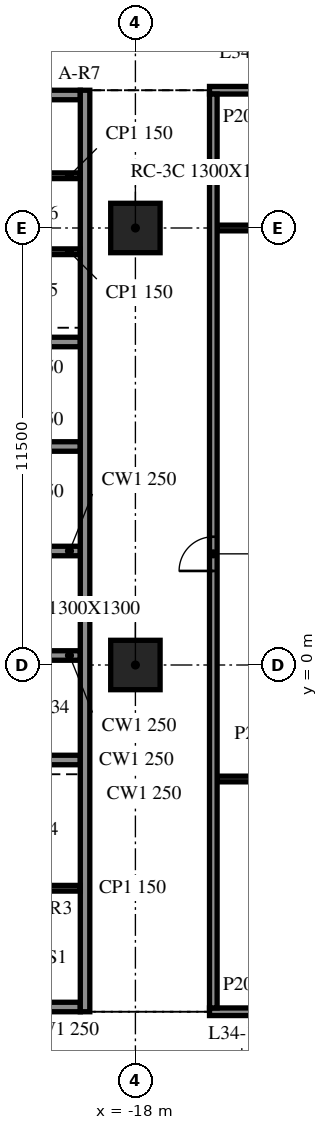
"""IFC4 building model, lengths in metres.
Left out: names, types, materials, properties, quantities, classifications, styles, units other than length and angle.
Written with IfcOpenShell. Run it as: python <this file> out.ifc"""

import sys

from ifc_helpers import new_model, si_unit, direction, frame, frame_2d, origin, origin_2d, place, context, subcontext, project, spatial, rectangle, extrude, element, fill, save


model = new_model("IFC4")
c1 = context("Model", 3, precision=1e-05, world=origin(), true_north=direction((0.0, 1.0)))
c2 = subcontext(c1, "Body", "Model", "MODEL_VIEW")
j1 = project(units=[si_unit("LENGTHUNIT", "METRE"), si_unit("PLANEANGLEUNIT", "RADIAN")], contexts=[c1])
p1 = place(None, origin())
s1 = spatial("IfcSite", under=j1, at=p1, CompositionType="ELEMENT")
p2 = place(p1, origin())
s2 = spatial("IfcBuilding", under=s1, at=p2, CompositionType="ELEMENT")
p3 = place(p2, frame((0.0, 0.0, 146.6)))
s3 = spatial("IfcBuildingStorey", under=s2, at=p3, CompositionType="ELEMENT", Elevation=146.6)
for number, where, z_axis, x_axis in (
    (1, (-18.0, 0.0, -0.34), (0.0, 0.0, 1.0), (1.0, 0.0, 0.0)),
    (2, (-18.0, 11.5, -0.34), (0.0, 0.0, 1.0), (1.0, 0.0, 0.0)),
):
    element("IfcColumn", number, at=place(p3, frame(where, z_axis=z_axis, x_axis=x_axis)), inside=s3, PredefinedType="COLUMN", context=c2, shape_type="SweptSolid", body=[
        extrude(rectangle(XDim=1.3, YDim=1.3, at=origin_2d()), origin(), (0.0, 0.0, 1.0), 4.1),
    ])
p4 = place(p3, frame((-19.325, -9.125, 0.0), z_axis=(0.0, 0.0, 1.0), x_axis=(0.0, 1.0, 0.0)))
e3 = element("IfcWall", 3, at=p4, inside=s3, PredefinedType="SOLIDWALL", context=c2, shape_type="SweptSolid", body=[
    extrude(rectangle(XDim=24.25, YDim=0.25, at=frame_2d((12.125, 0.0))), origin(), (0.0, 0.0, 1.0), 3.76),
])
p5 = place(p3, frame((-19.45, -9.0, 0.0), z_axis=(0.0, 0.0, 1.0), x_axis=(-1.0, 0.0, 0.0)))
e4 = element("IfcWall", 4, at=p5, inside=s3, PredefinedType="SOLIDWALL", context=c2, shape_type="SweptSolid", body=[
    extrude(rectangle(XDim=9.1, YDim=0.25, at=frame_2d((4.55, 0.0))), origin(), (0.0, 0.0, 1.0), 3.76),
])
p6 = place(p5, frame((3.65, 0.0, 0.0)))
e5 = element("IfcOpeningElement", 5, at=p6, cuts=e4, PredefinedType="OPENING", context=c2, shape_type="SweptSolid", body=[
    extrude(rectangle(XDim=1.8, YDim=2.1, at=frame_2d((0.9, 1.05))), frame((0.0, 0.135, 0.0), z_axis=(0.0, -1.0, 0.0), x_axis=(1.0, 0.0, 0.0)), (0.0, 0.0, 1.0), 0.27),
])
p7 = place(p3, frame((-28.55, 15.0, 0.0), z_axis=(0.0, 0.0, 1.0), x_axis=(1.0, 0.0, 0.0)))
e6 = element("IfcWall", 6, at=p7, inside=s3, PredefinedType="SOLIDWALL", context=c2, shape_type="SweptSolid", body=[
    extrude(rectangle(XDim=9.1, YDim=0.25, at=frame_2d((4.55, 0.0))), origin(), (0.0, 0.0, 1.0), 3.76),
])
p8 = place(p7, frame((3.65, 0.0, 0.0)))
e7 = element("IfcOpeningElement", 7, at=p8, cuts=e6, PredefinedType="OPENING", context=c2, shape_type="SweptSolid", body=[
    extrude(rectangle(XDim=1.8, YDim=2.1, at=frame_2d((0.9, 1.05))), frame((0.0, 0.135, 0.0), z_axis=(0.0, -1.0, 0.0), x_axis=(1.0, 0.0, 0.0)), (0.0, 0.0, 1.0), 0.27),
])
for number, where, z_axis, x_axis in (
    (8, (-22.3, -2.5, 0.0), (0.0, 0.0, 1.0), (1.0, 0.0, 0.0)),
    (9, (-22.3, 0.25, 0.0), (0.0, 0.0, 1.0), (1.0, 0.0, 0.0)),
    (10, (-22.3, 3.0, 0.0), (0.0, 0.0, 1.0), (1.0, 0.0, 0.0)),
    (11, (-22.3, 5.75, 0.0), (0.0, 0.0, 1.0), (1.0, 0.0, 0.0)),
    (12, (-22.3, 8.5, 0.0), (0.0, 0.0, 1.0), (1.0, 0.0, 0.0)),
):
    element("IfcWall", number, at=place(p3, frame(where, z_axis=z_axis, x_axis=x_axis)), inside=s3, PredefinedType="SOLIDWALL", context=c2, shape_type="SweptSolid", body=[
        extrude(rectangle(XDim=2.85, YDim=0.25, at=frame_2d((1.425, 0.0))), origin(), (0.0, 0.0, 1.0), 3.76),
    ])
for number, where, z_axis, x_axis in (
    (13, (-22.3, -5.875, 0.0), (0.0, 0.0, 1.0), (1.0, 0.0, 0.0)),
    (14, (-22.3, 10.875, 0.0), (0.0, 0.0, 1.0), (1.0, 0.0, 0.0)),
    (15, (-22.3, 12.875, 0.0), (0.0, 0.0, 1.0), (1.0, 0.0, 0.0)),
):
    element("IfcWall", number, at=place(p3, frame(where, z_axis=z_axis, x_axis=x_axis)), inside=s3, PredefinedType="PARTITIONING", context=c2, shape_type="SweptSolid", body=[
        extrude(rectangle(XDim=2.85, YDim=0.15, at=frame_2d((1.425, 0.0))), origin(), (0.0, 0.0, 1.0), 3.76),
    ])
p9 = place(p3, frame((-16.05, -9.125, 0.0), z_axis=(0.0, 0.0, 1.0), x_axis=(1.0, 0.0, 0.0)))
e16 = element("IfcWall", 16, at=p9, inside=s3, PredefinedType="PARTITIONING", context=c2, shape_type="SweptSolid", body=[
    extrude(rectangle(XDim=8.0, YDim=0.2, at=frame_2d((4.0, 0.0))), origin(), (0.0, 0.0, 1.0), 3.76),
])
p10 = place(p9, frame((3.5, 0.0, 0.0)))
e17 = element("IfcOpeningElement", 17, at=p10, cuts=e16, PredefinedType="OPENING", context=c2, shape_type="SweptSolid", body=[
    extrude(rectangle(XDim=1.0, YDim=2.1, at=frame_2d((0.5, 1.05))), frame((0.0, 0.11, 0.0), z_axis=(0.0, -1.0, 0.0), x_axis=(1.0, 0.0, 0.0)), (0.0, 0.0, 1.0), 0.22),
])
for number, where, z_axis, x_axis in (
    (18, (-15.85, -3.0, 0.0), (0.0, 0.0, 1.0), (1.0, 0.0, 0.0)),
    (19, (-15.85, 11.5, 0.0), (0.0, 0.0, 1.0), (1.0, 0.0, 0.0)),
):
    element("IfcWall", number, at=place(p3, frame(where, z_axis=z_axis, x_axis=x_axis)), inside=s3, PredefinedType="PARTITIONING", context=c2, shape_type="SweptSolid", body=[
        extrude(rectangle(XDim=7.6, YDim=0.15, at=frame_2d((3.8, 0.0))), origin(), (0.0, 0.0, 1.0), 3.76),
    ])
p11 = place(p3, frame((-16.05, 15.125, 0.0), z_axis=(0.0, 0.0, 1.0), x_axis=(1.0, 0.0, 0.0)))
e20 = element("IfcWall", 20, at=p11, inside=s3, PredefinedType="PARTITIONING", context=c2, shape_type="SweptSolid", body=[
    extrude(rectangle(XDim=8.0, YDim=0.2, at=frame_2d((4.0, 0.0))), origin(), (0.0, 0.0, 1.0), 3.76),
])
p12 = place(p11, frame((3.5, 0.0, 0.0)))
e21 = element("IfcOpeningElement", 21, at=p12, cuts=e20, PredefinedType="OPENING", context=c2, shape_type="SweptSolid", body=[
    extrude(rectangle(XDim=1.0, YDim=2.1, at=frame_2d((0.5, 1.05))), frame((0.0, 0.11, 0.0), z_axis=(0.0, -1.0, 0.0), x_axis=(1.0, 0.0, 0.0)), (0.0, 0.0, 1.0), 0.22),
])
p13 = place(p3, frame((-15.95, -9.025, 0.0), z_axis=(0.0, 0.0, 1.0), x_axis=(0.0, 1.0, 0.0)))
e22 = element("IfcWall", 22, at=p13, inside=s3, PredefinedType="PARTITIONING", context=c2, shape_type="SweptSolid", body=[
    extrude(rectangle(XDim=24.05, YDim=0.2, at=frame_2d((12.025, 0.0))), origin(), (0.0, 0.0, 1.0), 3.76),
])
p14 = place(p13, frame((11.5, 0.0, 0.0)))
e23 = element("IfcOpeningElement", 23, at=p14, cuts=e22, PredefinedType="OPENING", context=c2, shape_type="SweptSolid", body=[
    extrude(rectangle(XDim=0.9, YDim=2.1, at=frame_2d((0.45, 1.05))), frame((0.0, 0.11, 0.0), z_axis=(0.0, -1.0, 0.0), x_axis=(1.0, 0.0, 0.0)), (0.0, 0.0, 1.0), 0.22),
])
p15 = place(p14, origin())
e24 = element("IfcDoor", 24, at=p15, inside=s3, OperationType="SINGLE_SWING_RIGHT", PredefinedType="DOOR", context=c2, shape_type="SweptSolid", body=[
    extrude(rectangle(XDim=0.9, YDim=2.1, at=frame_2d((0.45, 1.05))), frame((0.0, 0.025, 0.0), z_axis=(0.0, -1.0, 0.0), x_axis=(1.0, 0.0, 0.0)), (0.0, 0.0, 1.0), 0.05),
])
fill(e23, e24)
save(model, sys.argv[1])
